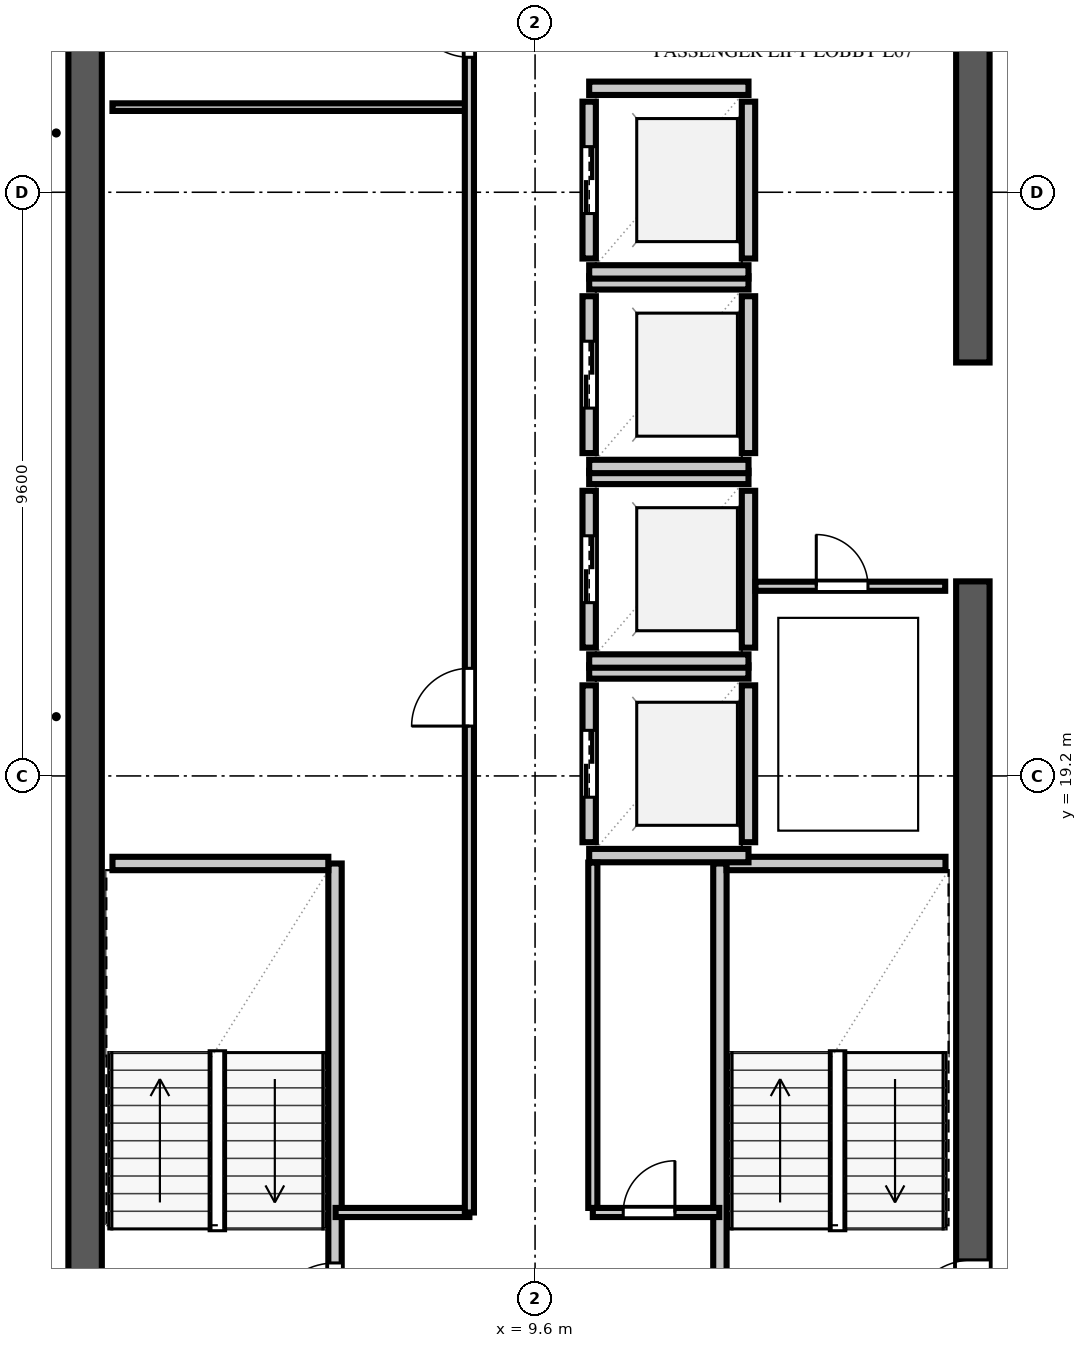
"""IFC4 building model, lengths in metres.
Left out: names, types, materials, properties, quantities, classifications, styles, units other than length and angle.
Written with IfcOpenShell. Run it as: python <this file> out.ifc"""

import sys

from ifc_helpers import new_model, si_unit, direction, frame, frame_2d, origin, place, context, subcontext, project, spatial, rectangle, extrude, element, fill, save


model = new_model("IFC4")
c1 = context("Model", 3, precision=1e-05, world=origin(), true_north=direction((0.0, 1.0)))
c2 = subcontext(c1, "Body", "Model", "MODEL_VIEW")
j1 = project(units=[si_unit("LENGTHUNIT", "METRE"), si_unit("PLANEANGLEUNIT", "RADIAN")], contexts=[c1])
p1 = place(None, origin())
s1 = spatial("IfcSite", under=j1, at=p1, CompositionType="ELEMENT")
p2 = place(p1, origin())
s2 = spatial("IfcBuilding", under=s1, at=p2, CompositionType="ELEMENT")
p3 = place(p2, frame((0.0, 0.0, 265.8)))
s3 = spatial("IfcBuildingStorey", under=s2, at=p3, CompositionType="ELEMENT", Elevation=265.8)
p4 = place(p3, frame((2.2, 9.325, 0.0), z_axis=(0.0, 0.0, 1.0), x_axis=(0.0, 1.0, 0.0)))
e1 = element("IfcWall", 1, at=p4, inside=s3, PredefinedType="SHEAR", context=c2, shape_type="SweptSolid", body=[
    extrude(rectangle(XDim=38.95, YDim=0.55, at=frame_2d((19.475, 0.0))), origin(), (0.0, 0.0, 1.0), 3.54),
])
p5 = place(p3, frame((16.8, 9.875, 0.0), z_axis=(0.0, 0.0, 1.0), x_axis=(0.0, 1.0, 0.0)))
e2 = element("IfcWall", 2, at=p5, inside=s3, PredefinedType="SHEAR", context=c2, shape_type="SweptSolid", body=[
    extrude(rectangle(XDim=12.525, YDim=0.55, at=frame_2d((6.262, 0.0))), origin(), (0.0, 0.0, 1.0), 3.54),
])
p6 = place(p5, frame((0.265, 0.0, 0.0)))
e3 = element("IfcOpeningElement", 3, at=p6, cuts=e2, PredefinedType="OPENING", context=c2, shape_type="SweptSolid", body=[
    extrude(rectangle(XDim=1.1, YDim=2.2, at=frame_2d((0.55, 1.1))), frame((0.0, 0.287, 0.0), z_axis=(0.0, -1.0, 0.0), x_axis=(1.0, 0.0, 0.0)), (0.0, 0.0, 1.0), 0.574),
])
p7 = place(p3, frame((16.8, 26.0, 0.0), z_axis=(0.0, 0.0, 1.0), x_axis=(0.0, 1.0, 0.0)))
e4 = element("IfcWall", 4, at=p7, inside=s3, PredefinedType="SHEAR", context=c2, shape_type="SweptSolid", body=[
    extrude(rectangle(XDim=7.8, YDim=0.55, at=frame_2d((3.9, 0.0))), origin(), (0.0, 0.0, 1.0), 3.54),
])
p8 = place(p3, frame((6.31, 9.95, 0.0), z_axis=(0.0, 0.0, 1.0), x_axis=(0.0, 1.0, 0.0)))
e5 = element("IfcWall", 5, at=p8, inside=s3, PredefinedType="SOLIDWALL", context=c2, shape_type="SweptSolid", body=[
    extrude(rectangle(XDim=7.81, YDim=0.22, at=frame_2d((3.905, 0.0))), origin(), (0.0, 0.0, 1.0), 3.54),
])
p9 = place(p8, frame((0.14, 0.0, 0.0)))
e6 = element("IfcOpeningElement", 6, at=p9, cuts=e5, PredefinedType="OPENING", context=c2, shape_type="SweptSolid", body=[
    extrude(rectangle(XDim=1.1, YDim=2.2, at=frame_2d((0.55, 1.1))), frame((0.0, 0.122, 0.0), z_axis=(0.0, -1.0, 0.0), x_axis=(1.0, 0.0, 0.0)), (0.0, 0.0, 1.0), 0.244),
])
p10 = place(p3, frame((2.65, 17.76, 0.0), z_axis=(0.0, 0.0, 1.0), x_axis=(1.0, 0.0, 0.0)))
e7 = element("IfcWall", 7, at=p10, inside=s3, PredefinedType="SOLIDWALL", context=c2, shape_type="SweptSolid", body=[
    extrude(rectangle(XDim=3.55, YDim=0.22, at=frame_2d((1.775, 0.0))), origin(), (0.0, 0.0, 1.0), 3.54),
])
p11 = place(p3, frame((12.64, 10.05, 0.0), z_axis=(0.0, 0.0, 1.0), x_axis=(0.0, 1.0, 0.0)))
e8 = element("IfcWall", 8, at=p11, inside=s3, PredefinedType="SOLIDWALL", context=c2, shape_type="SweptSolid", body=[
    extrude(rectangle(XDim=7.71, YDim=0.22, at=frame_2d((3.855, 0.0))), origin(), (0.0, 0.0, 1.0), 3.54),
])
p12 = place(p3, frame((12.75, 17.76, 0.0), z_axis=(0.0, 0.0, 1.0), x_axis=(1.0, 0.0, 0.0)))
e9 = element("IfcWall", 9, at=p12, inside=s3, PredefinedType="SOLIDWALL", context=c2, shape_type="SweptSolid", body=[
    extrude(rectangle(XDim=3.6, YDim=0.22, at=frame_2d((1.8, 0.0))), origin(), (0.0, 0.0, 1.0), 3.54),
])
p13 = place(p3, frame((10.49, 18.11, 0.0), z_axis=(0.0, 0.0, 1.0), x_axis=(0.0, 1.0, 0.0)))
e10 = element("IfcWall", 10, at=p13, inside=s3, PredefinedType="SOLIDWALL", context=c2, shape_type="SweptSolid", body=[
    extrude(rectangle(XDim=2.58, YDim=0.22, at=frame_2d((1.29, 0.0))), origin(), (0.0, 0.0, 1.0), 3.54),
])
p14 = place(p13, frame((0.74, 0.0, 0.0)))
e11 = element("IfcOpeningElement", 11, at=p14, cuts=e10, PredefinedType="OPENING", context=c2, shape_type="SweptSolid", body=[
    extrude(rectangle(XDim=1.1, YDim=2.2, at=frame_2d((0.55, 1.1))), frame((0.0, 0.122, 0.0), z_axis=(0.0, -1.0, 0.0), x_axis=(1.0, 0.0, 0.0)), (0.0, 0.0, 1.0), 0.244),
])
p15 = place(p3, frame((13.11, 18.11, 0.0), z_axis=(0.0, 0.0, 1.0), x_axis=(0.0, 1.0, 0.0)))
e12 = element("IfcWall", 12, at=p15, inside=s3, PredefinedType="SOLIDWALL", context=c2, shape_type="SweptSolid", body=[
    extrude(rectangle(XDim=2.58, YDim=0.22, at=frame_2d((1.29, 0.0))), origin(), (0.0, 0.0, 1.0), 3.54),
])
for number, where, z_axis, x_axis in (
    (13, (10.49, 17.89, 0.0), (0.0, 0.0, 1.0), (1.0, 0.0, 0.0)),
    (14, (10.49, 20.91, 0.0), (0.0, 0.0, 1.0), (1.0, 0.0, 0.0)),
):
    element("IfcWall", number, at=place(p3, frame(where, z_axis=z_axis, x_axis=x_axis)), inside=s3, PredefinedType="SOLIDWALL", context=c2, shape_type="SweptSolid", body=[
        extrude(rectangle(XDim=2.62, YDim=0.22, at=frame_2d((1.31, 0.0))), origin(), (0.0, 0.0, 1.0), 3.54),
    ])
p16 = place(p3, frame((10.49, 21.31, 0.0), z_axis=(0.0, 0.0, 1.0), x_axis=(0.0, 1.0, 0.0)))
e15 = element("IfcWall", 15, at=p16, inside=s3, PredefinedType="SOLIDWALL", context=c2, shape_type="SweptSolid", body=[
    extrude(rectangle(XDim=2.58, YDim=0.22, at=frame_2d((1.29, 0.0))), origin(), (0.0, 0.0, 1.0), 3.54),
])
p17 = place(p16, frame((0.74, 0.0, 0.0)))
e16 = element("IfcOpeningElement", 16, at=p17, cuts=e15, PredefinedType="OPENING", context=c2, shape_type="SweptSolid", body=[
    extrude(rectangle(XDim=1.1, YDim=2.2, at=frame_2d((0.55, 1.1))), frame((0.0, 0.122, 0.0), z_axis=(0.0, -1.0, 0.0), x_axis=(1.0, 0.0, 0.0)), (0.0, 0.0, 1.0), 0.244),
])
p18 = place(p3, frame((13.11, 21.31, 0.0), z_axis=(0.0, 0.0, 1.0), x_axis=(0.0, 1.0, 0.0)))
e17 = element("IfcWall", 17, at=p18, inside=s3, PredefinedType="SOLIDWALL", context=c2, shape_type="SweptSolid", body=[
    extrude(rectangle(XDim=2.58, YDim=0.22, at=frame_2d((1.29, 0.0))), origin(), (0.0, 0.0, 1.0), 3.54),
])
for number, where, z_axis, x_axis in (
    (18, (10.49, 21.09, 0.0), (0.0, 0.0, 1.0), (1.0, 0.0, 0.0)),
    (19, (10.49, 24.11, 0.0), (0.0, 0.0, 1.0), (1.0, 0.0, 0.0)),
):
    element("IfcWall", number, at=place(p3, frame(where, z_axis=z_axis, x_axis=x_axis)), inside=s3, PredefinedType="SOLIDWALL", context=c2, shape_type="SweptSolid", body=[
        extrude(rectangle(XDim=2.62, YDim=0.22, at=frame_2d((1.31, 0.0))), origin(), (0.0, 0.0, 1.0), 3.54),
    ])
p19 = place(p3, frame((10.49, 24.51, 0.0), z_axis=(0.0, 0.0, 1.0), x_axis=(0.0, 1.0, 0.0)))
e20 = element("IfcWall", 20, at=p19, inside=s3, PredefinedType="SOLIDWALL", context=c2, shape_type="SweptSolid", body=[
    extrude(rectangle(XDim=2.58, YDim=0.22, at=frame_2d((1.29, 0.0))), origin(), (0.0, 0.0, 1.0), 3.54),
])
p20 = place(p19, frame((0.74, 0.0, 0.0)))
e21 = element("IfcOpeningElement", 21, at=p20, cuts=e20, PredefinedType="OPENING", context=c2, shape_type="SweptSolid", body=[
    extrude(rectangle(XDim=1.1, YDim=2.2, at=frame_2d((0.55, 1.1))), frame((0.0, 0.122, 0.0), z_axis=(0.0, -1.0, 0.0), x_axis=(1.0, 0.0, 0.0)), (0.0, 0.0, 1.0), 0.244),
])
p21 = place(p3, frame((13.11, 24.51, 0.0), z_axis=(0.0, 0.0, 1.0), x_axis=(0.0, 1.0, 0.0)))
e22 = element("IfcWall", 22, at=p21, inside=s3, PredefinedType="SOLIDWALL", context=c2, shape_type="SweptSolid", body=[
    extrude(rectangle(XDim=2.58, YDim=0.22, at=frame_2d((1.29, 0.0))), origin(), (0.0, 0.0, 1.0), 3.54),
])
for number, where, z_axis, x_axis in (
    (23, (10.49, 24.29, 0.0), (0.0, 0.0, 1.0), (1.0, 0.0, 0.0)),
    (24, (10.49, 27.31, 0.0), (0.0, 0.0, 1.0), (1.0, 0.0, 0.0)),
):
    element("IfcWall", number, at=place(p3, frame(where, z_axis=z_axis, x_axis=x_axis)), inside=s3, PredefinedType="SOLIDWALL", context=c2, shape_type="SweptSolid", body=[
        extrude(rectangle(XDim=2.62, YDim=0.22, at=frame_2d((1.31, 0.0))), origin(), (0.0, 0.0, 1.0), 3.54),
    ])
p22 = place(p3, frame((10.49, 27.71, 0.0), z_axis=(0.0, 0.0, 1.0), x_axis=(0.0, 1.0, 0.0)))
e25 = element("IfcWall", 25, at=p22, inside=s3, PredefinedType="SOLIDWALL", context=c2, shape_type="SweptSolid", body=[
    extrude(rectangle(XDim=2.58, YDim=0.22, at=frame_2d((1.29, 0.0))), origin(), (0.0, 0.0, 1.0), 3.54),
])
p23 = place(p22, frame((0.74, 0.0, 0.0)))
e26 = element("IfcOpeningElement", 26, at=p23, cuts=e25, PredefinedType="OPENING", context=c2, shape_type="SweptSolid", body=[
    extrude(rectangle(XDim=1.1, YDim=2.2, at=frame_2d((0.55, 1.1))), frame((0.0, 0.122, 0.0), z_axis=(0.0, -1.0, 0.0), x_axis=(1.0, 0.0, 0.0)), (0.0, 0.0, 1.0), 0.244),
])
p24 = place(p3, frame((13.11, 27.71, 0.0), z_axis=(0.0, 0.0, 1.0), x_axis=(0.0, 1.0, 0.0)))
e27 = element("IfcWall", 27, at=p24, inside=s3, PredefinedType="SOLIDWALL", context=c2, shape_type="SweptSolid", body=[
    extrude(rectangle(XDim=2.58, YDim=0.22, at=frame_2d((1.29, 0.0))), origin(), (0.0, 0.0, 1.0), 3.54),
])
for number, where, z_axis, x_axis in (
    (28, (10.49, 27.49, 0.0), (0.0, 0.0, 1.0), (1.0, 0.0, 0.0)),
    (29, (10.49, 30.51, 0.0), (0.0, 0.0, 1.0), (1.0, 0.0, 0.0)),
):
    element("IfcWall", number, at=place(p3, frame(where, z_axis=z_axis, x_axis=x_axis)), inside=s3, PredefinedType="SOLIDWALL", context=c2, shape_type="SweptSolid", body=[
        extrude(rectangle(XDim=2.62, YDim=0.22, at=frame_2d((1.31, 0.0))), origin(), (0.0, 0.0, 1.0), 3.54),
    ])
p25 = place(p3, frame((10.55, 12.02, 0.0), z_axis=(0.0, 0.0, 1.0), x_axis=(1.0, 0.0, 0.0)))
e30 = element("IfcWall", 30, at=p25, inside=s3, PredefinedType="PARTITIONING", context=c2, shape_type="SweptSolid", body=[
    extrude(rectangle(XDim=2.08, YDim=0.15, at=frame_2d((1.04, 0.0))), origin(), (0.0, 0.0, 1.0), 3.54),
])
p26 = place(p25, frame((0.5, 0.0, 0.0)))
e31 = element("IfcOpeningElement", 31, at=p26, cuts=e30, PredefinedType="OPENING", context=c2, shape_type="SweptSolid", body=[
    extrude(rectangle(XDim=0.85, YDim=2.1, at=frame_2d((0.425, 1.05))), frame((0.0, 0.087, 0.0), z_axis=(0.0, -1.0, 0.0), x_axis=(1.0, 0.0, 0.0)), (0.0, 0.0, 1.0), 0.174),
])
p27 = place(p3, frame((10.55, 12.095, 0.0), z_axis=(0.0, 0.0, 1.0), x_axis=(0.0, 1.0, 0.0)))
e32 = element("IfcWall", 32, at=p27, inside=s3, PredefinedType="PARTITIONING", context=c2, shape_type="SweptSolid", body=[
    extrude(rectangle(XDim=5.68, YDim=0.15, at=frame_2d((2.84, 0.0))), origin(), (0.0, 0.0, 1.0), 3.54),
])
p28 = place(p3, frame((13.225, 22.32, 0.0), z_axis=(0.0, 0.0, 1.0), x_axis=(1.0, 0.0, 0.0)))
e33 = element("IfcWall", 33, at=p28, inside=s3, PredefinedType="PARTITIONING", context=c2, shape_type="SweptSolid", body=[
    extrude(rectangle(XDim=3.12, YDim=0.15, at=frame_2d((1.56, 0.0))), origin(), (0.0, 0.0, 1.0), 3.54),
])
p29 = place(p28, frame((1.0, 0.0, 0.0)))
e34 = element("IfcOpeningElement", 34, at=p29, cuts=e33, PredefinedType="OPENING", context=c2, shape_type="SweptSolid", body=[
    extrude(rectangle(XDim=0.85, YDim=2.1, at=frame_2d((0.425, 1.05))), frame((0.0, 0.087, 0.0), z_axis=(0.0, -1.0, 0.0), x_axis=(1.0, 0.0, 0.0)), (0.0, 0.0, 1.0), 0.174),
])
p30 = place(p3, frame((6.32, 12.02, 0.0), z_axis=(0.0, 0.0, 1.0), x_axis=(1.0, 0.0, 0.0)))
e35 = element("IfcWall", 35, at=p30, inside=s3, PredefinedType="PARTITIONING", context=c2, shape_type="SweptSolid", body=[
    extrude(rectangle(XDim=2.2, YDim=0.15, at=frame_2d((1.1, 0.0))), origin(), (0.0, 0.0, 1.0), 3.54),
])
p31 = place(p3, frame((2.65, 30.2, 0.0), z_axis=(0.0, 0.0, 1.0), x_axis=(1.0, 0.0, 0.0)))
e36 = element("IfcWall", 36, at=p31, inside=s3, PredefinedType="PARTITIONING", context=c2, shape_type="SweptSolid", body=[
    extrude(rectangle(XDim=5.87, YDim=0.125, at=frame_2d((2.935, 0.0))), origin(), (0.0, 0.0, 1.0), 3.54),
])
p32 = place(p3, frame((8.52, 12.02, 0.0), z_axis=(0.0, 0.0, 1.0), x_axis=(0.0, 1.0, 0.0)))
e37 = element("IfcWall", 37, at=p32, inside=s3, PredefinedType="PARTITIONING", context=c2, shape_type="SweptSolid", body=[
    extrude(rectangle(XDim=24.76, YDim=0.15, at=frame_2d((12.38, 0.0))), origin(), (0.0, 0.0, 1.0), 3.54),
])
p33 = place(p32, frame((8.0, 0.0, 0.0)))
e38 = element("IfcOpeningElement", 38, at=p33, cuts=e37, PredefinedType="OPENING", context=c2, shape_type="SweptSolid", body=[
    extrude(rectangle(XDim=0.95, YDim=2.15, at=frame_2d((0.475, 1.075))), frame((0.0, 0.087, 0.0), z_axis=(0.0, -1.0, 0.0), x_axis=(1.0, 0.0, 0.0)), (0.0, 0.0, 1.0), 0.174),
])
p34 = place(p32, frame((19.0, 0.0, 0.0)))
e39 = element("IfcOpeningElement", 39, at=p34, cuts=e37, PredefinedType="OPENING", context=c2, shape_type="SweptSolid", body=[
    extrude(rectangle(XDim=0.95, YDim=2.15, at=frame_2d((0.475, 1.075))), frame((0.0, 0.087, 0.0), z_axis=(0.0, -1.0, 0.0), x_axis=(1.0, 0.0, 0.0)), (0.0, 0.0, 1.0), 0.174),
])
p35 = place(p9, origin())
e40 = element("IfcDoor", 40, at=p35, inside=s3, OperationType="SINGLE_SWING_LEFT", PredefinedType="DOOR", context=c2, shape_type="SweptSolid", body=[
    extrude(rectangle(XDim=1.1, YDim=2.2, at=frame_2d((0.55, 1.1))), frame((0.0, 0.025, 0.0), z_axis=(0.0, -1.0, 0.0), x_axis=(1.0, 0.0, 0.0)), (0.0, 0.0, 1.0), 0.05),
])
fill(e6, e40)
p36 = place(p6, origin())
e41 = element("IfcDoor", 41, at=p36, inside=s3, OperationType="SINGLE_SWING_LEFT", PredefinedType="DOOR", context=c2, shape_type="SweptSolid", body=[
    extrude(rectangle(XDim=1.1, YDim=2.2, at=frame_2d((0.55, 1.1))), frame((0.0, 0.025, 0.0), z_axis=(0.0, -1.0, 0.0), x_axis=(1.0, 0.0, 0.0)), (0.0, 0.0, 1.0), 0.05),
])
fill(e3, e41)
p37 = place(p14, origin())
e42 = element("IfcDoor", 42, at=p37, inside=s3, OperationType="DOUBLE_DOOR_SLIDING", PredefinedType="DOOR", context=c2, shape_type="SweptSolid", body=[
    extrude(rectangle(XDim=1.1, YDim=2.2, at=frame_2d((0.55, 1.1))), frame((0.0, 0.025, 0.0), z_axis=(0.0, -1.0, 0.0), x_axis=(1.0, 0.0, 0.0)), (0.0, 0.0, 1.0), 0.05),
])
fill(e11, e42)
p38 = place(p17, origin())
e43 = element("IfcDoor", 43, at=p38, inside=s3, OperationType="DOUBLE_DOOR_SLIDING", PredefinedType="DOOR", context=c2, shape_type="SweptSolid", body=[
    extrude(rectangle(XDim=1.1, YDim=2.2, at=frame_2d((0.55, 1.1))), frame((0.0, 0.025, 0.0), z_axis=(0.0, -1.0, 0.0), x_axis=(1.0, 0.0, 0.0)), (0.0, 0.0, 1.0), 0.05),
])
fill(e16, e43)
p39 = place(p20, origin())
e44 = element("IfcDoor", 44, at=p39, inside=s3, OperationType="DOUBLE_DOOR_SLIDING", PredefinedType="DOOR", context=c2, shape_type="SweptSolid", body=[
    extrude(rectangle(XDim=1.1, YDim=2.2, at=frame_2d((0.55, 1.1))), frame((0.0, 0.025, 0.0), z_axis=(0.0, -1.0, 0.0), x_axis=(1.0, 0.0, 0.0)), (0.0, 0.0, 1.0), 0.05),
])
fill(e21, e44)
p40 = place(p23, origin())
e45 = element("IfcDoor", 45, at=p40, inside=s3, OperationType="DOUBLE_DOOR_SLIDING", PredefinedType="DOOR", context=c2, shape_type="SweptSolid", body=[
    extrude(rectangle(XDim=1.1, YDim=2.2, at=frame_2d((0.55, 1.1))), frame((0.0, 0.025, 0.0), z_axis=(0.0, -1.0, 0.0), x_axis=(1.0, 0.0, 0.0)), (0.0, 0.0, 1.0), 0.05),
])
fill(e26, e45)
p41 = place(p26, origin())
e46 = element("IfcDoor", 46, at=p41, inside=s3, OperationType="SINGLE_SWING_RIGHT", PredefinedType="DOOR", context=c2, shape_type="SweptSolid", body=[
    extrude(rectangle(XDim=0.85, YDim=2.1, at=frame_2d((0.425, 1.05))), frame((0.0, 0.025, 0.0), z_axis=(0.0, -1.0, 0.0), x_axis=(1.0, 0.0, 0.0)), (0.0, 0.0, 1.0), 0.05),
])
fill(e31, e46)
p42 = place(p29, origin())
e47 = element("IfcDoor", 47, at=p42, inside=s3, OperationType="SINGLE_SWING_LEFT", PredefinedType="DOOR", context=c2, shape_type="SweptSolid", body=[
    extrude(rectangle(XDim=0.85, YDim=2.1, at=frame_2d((0.425, 1.05))), frame((0.0, 0.025, 0.0), z_axis=(0.0, -1.0, 0.0), x_axis=(1.0, 0.0, 0.0)), (0.0, 0.0, 1.0), 0.05),
])
fill(e34, e47)
p43 = place(p33, origin())
e48 = element("IfcDoor", 48, at=p43, inside=s3, OperationType="SINGLE_SWING_LEFT", PredefinedType="DOOR", context=c2, shape_type="SweptSolid", body=[
    extrude(rectangle(XDim=0.95, YDim=2.15, at=frame_2d((0.475, 1.075))), frame((0.0, 0.025, 0.0), z_axis=(0.0, -1.0, 0.0), x_axis=(1.0, 0.0, 0.0)), (0.0, 0.0, 1.0), 0.05),
])
fill(e38, e48)
p44 = place(p34, origin())
e49 = element("IfcDoor", 49, at=p44, inside=s3, OperationType="SINGLE_SWING_RIGHT", PredefinedType="DOOR", context=c2, shape_type="SweptSolid", body=[
    extrude(rectangle(XDim=0.95, YDim=2.15, at=frame_2d((0.475, 1.075))), frame((0.0, 0.025, 0.0), z_axis=(0.0, -1.0, 0.0), x_axis=(1.0, 0.0, 0.0)), (0.0, 0.0, 1.0), 0.05),
])
fill(e39, e49)
save(model, sys.argv[1])
